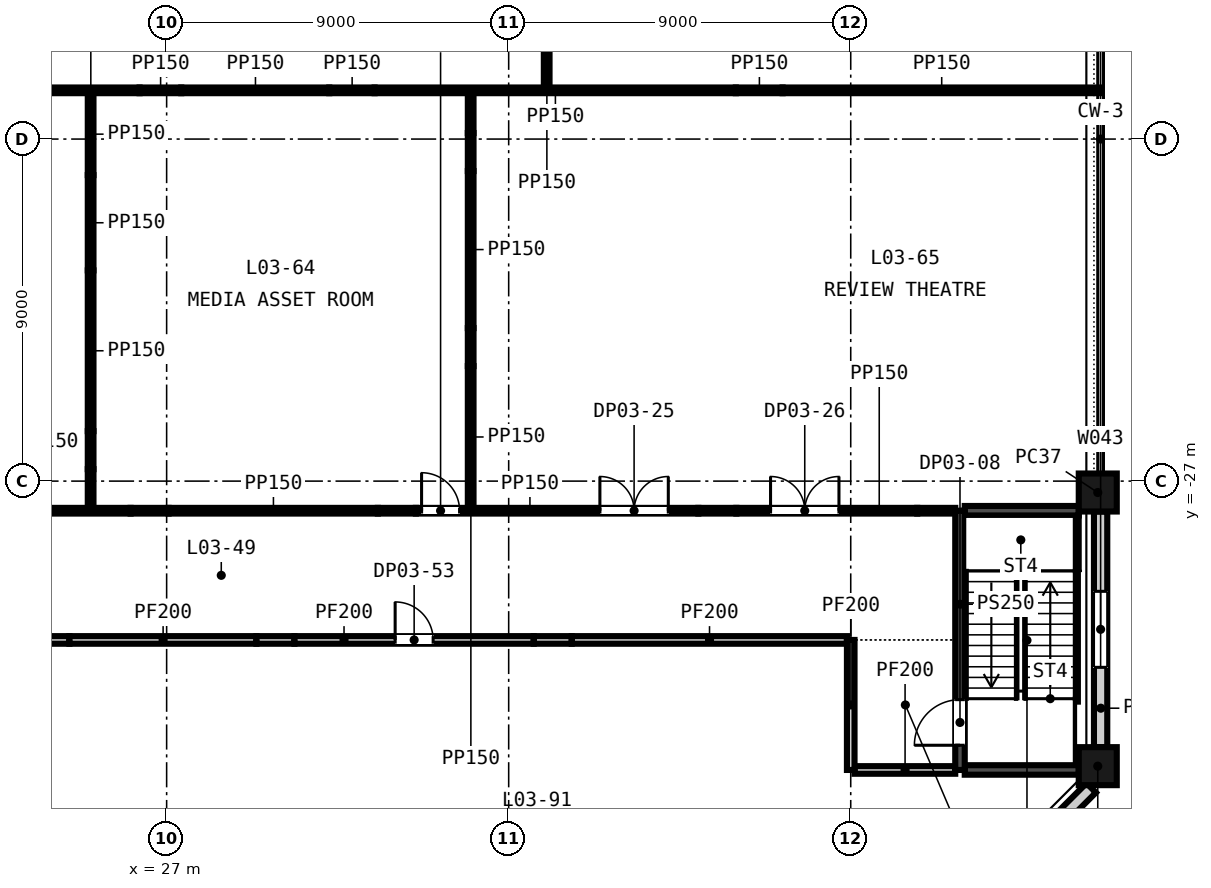
"""IFC4 building model, lengths in metres.
Left out: names, types, materials, properties, quantities, classifications, styles, units other than length and angle.
Written with IfcOpenShell. Run it as: python <this file> out.ifc"""

import sys

from ifc_helpers import new_model, si_unit, direction, frame, frame_2d, origin, origin_2d, place, context, subcontext, project, spatial, rectangle, extrude, element, fill, save


model = new_model("IFC4")
c1 = context("Model", 3, precision=1e-05, world=origin(), true_north=direction((0.0, 1.0)))
c2 = subcontext(c1, "Body", "Model", "MODEL_VIEW")
j1 = project(units=[si_unit("LENGTHUNIT", "METRE"), si_unit("PLANEANGLEUNIT", "RADIAN")], contexts=[c1])
p1 = place(None, origin())
s1 = spatial("IfcSite", under=j1, at=p1, CompositionType="ELEMENT")
p2 = place(p1, origin())
s2 = spatial("IfcBuilding", under=s1, at=p2, CompositionType="ELEMENT")
p3 = place(p2, frame((0.0, 0.0, 22.5)))
s3 = spatial("IfcBuildingStorey", under=s2, at=p3, CompositionType="ELEMENT", Elevation=22.5)
for number, where, z_axis, x_axis in (
    (1, (51.5, -34.5, -0.3), (0.0, 0.0, 1.0), (0.0, 1.0, 0.0)),
    (2, (51.5, -27.3, -0.3), (0.0, 0.0, 1.0), (0.0, 1.0, 0.0)),
):
    element("IfcColumn", number, at=place(p3, frame(where, z_axis=z_axis, x_axis=x_axis)), inside=s3, PredefinedType="COLUMN", context=c2, shape_type="SweptSolid", body=[
        extrude(rectangle(XDim=1.0, YDim=1.0, at=origin_2d()), origin(), (0.0, 0.0, 1.0), 4.5),
    ])
p4 = place(p3, frame((46.072, -40.327, -0.3), z_axis=(0.0, 0.0, 1.0), x_axis=(0.707106781187, 0.707106781187, 0.0)))
e3 = element("IfcWall", 3, at=p4, inside=s3, PredefinedType="SOLIDWALL", context=c2, shape_type="SweptSolid", body=[
    extrude(rectangle(XDim=7.433, YDim=0.35, at=frame_2d((3.716, 0.0))), origin(), (0.0, 0.0, 1.0), 3.6),
])
p5 = place(p3, frame((51.575, -34.0, -0.3), z_axis=(0.0, 0.0, 1.0), x_axis=(0.0, 1.0, 0.0)))
e4 = element("IfcWall", 4, at=p5, inside=s3, PredefinedType="SOLIDWALL", context=c2, shape_type="SweptSolid", body=[
    extrude(rectangle(XDim=6.2, YDim=0.35, at=frame_2d((3.1, 0.0))), origin(), (0.0, 0.0, 1.0), 3.6),
])
p6 = place(p5, frame((2.1, 0.0, 1.2)))
e5 = element("IfcOpeningElement", 5, at=p6, cuts=e4, PredefinedType="OPENING", context=c2, shape_type="SweptSolid", body=[
    extrude(rectangle(XDim=2.0, YDim=2.35, at=frame_2d((1.0, 1.175))), frame((0.0, 0.185, 0.0), z_axis=(0.0, -1.0, 0.0), x_axis=(1.0, 0.0, 0.0)), (0.0, 0.0, 1.0), 0.37),
])
p7 = place(p3, frame((45.1, -34.6, 0.0), z_axis=(0.0, 0.0, 1.0), x_axis=(1.0, 0.0, 0.0)))
e6 = element("IfcWall", 6, at=p7, inside=s3, PredefinedType="PARTITIONING", context=c2, shape_type="SweptSolid", body=[
    extrude(rectangle(XDim=2.65, YDim=0.2, at=frame_2d((1.325, 0.0))), origin(), (0.0, 0.0, 1.0), 4.2),
])
p8 = place(p3, frame((48.0, -34.6, 0.0), z_axis=(0.0, 0.0, 1.0), x_axis=(1.0, 0.0, 0.0)))
e7 = element("IfcWall", 7, at=p8, inside=s3, PredefinedType="SHEAR", context=c2, shape_type="SweptSolid", body=[
    extrude(rectangle(XDim=3.0, YDim=0.25, at=frame_2d((1.5, 0.0))), origin(), (0.0, 0.0, 1.0), 4.2),
])
p9 = place(p3, frame((23.442, -31.179, 0.0), z_axis=(0.0, 0.0, 1.0), x_axis=(1.0, 0.0, 0.0)))
e8 = element("IfcWall", 8, at=p9, inside=s3, PredefinedType="PARTITIONING", context=c2, shape_type="SweptSolid", body=[
    extrude(rectangle(XDim=1.0, YDim=0.2, at=frame_2d((0.5, 0.0))), origin(), (0.0, 0.0, 1.0), 3.298),
])
p10 = place(p3, frame((24.442, -31.179, 0.0), z_axis=(0.0, 0.0, 1.0), x_axis=(1.0, 0.0, 0.0)))
e9 = element("IfcWall", 9, at=p10, inside=s3, PredefinedType="PARTITIONING", context=c2, shape_type="SweptSolid", body=[
    extrude(rectangle(XDim=4.921, YDim=0.2, at=frame_2d((2.46, 0.0))), origin(), (0.0, 0.0, 1.0), 4.2),
])
p11 = place(p3, frame((29.363, -31.179, 0.0), z_axis=(0.0, 0.0, 1.0), x_axis=(1.0, 0.0, 0.0)))
e10 = element("IfcWall", 10, at=p11, inside=s3, PredefinedType="PARTITIONING", context=c2, shape_type="SweptSolid", body=[
    extrude(rectangle(XDim=1.0, YDim=0.2, at=frame_2d((0.5, 0.0))), origin(), (0.0, 0.0, 1.0), 3.219),
])
p12 = place(p3, frame((30.363, -31.179, 0.0), z_axis=(0.0, 0.0, 1.0), x_axis=(1.0, 0.0, 0.0)))
e11 = element("IfcWall", 11, at=p12, inside=s3, PredefinedType="PARTITIONING", context=c2, shape_type="SweptSolid", body=[
    extrude(rectangle(XDim=6.297, YDim=0.2, at=frame_2d((3.148, 0.0))), origin(), (0.0, 0.0, 1.0), 4.2),
])
p13 = place(p12, frame((2.65, 0.0, 0.0)))
e12 = element("IfcOpeningElement", 12, at=p13, cuts=e11, PredefinedType="OPENING", context=c2, shape_type="SweptSolid", body=[
    extrude(rectangle(XDim=1.0, YDim=2.1, at=frame_2d((0.5, 1.05))), frame((0.0, 0.11, 0.0), z_axis=(0.0, -1.0, 0.0), x_axis=(1.0, 0.0, 0.0)), (0.0, 0.0, 1.0), 0.22),
])
p14 = place(p3, frame((36.659, -31.179, 0.0), z_axis=(0.0, 0.0, 1.0), x_axis=(1.0, 0.0, 0.0)))
e13 = element("IfcWall", 13, at=p14, inside=s3, PredefinedType="PARTITIONING", context=c2, shape_type="SweptSolid", body=[
    extrude(rectangle(XDim=1.0, YDim=0.2, at=frame_2d((0.5, 0.0))), origin(), (0.0, 0.0, 1.0), 3.111),
])
p15 = place(p3, frame((37.659, -31.179, 0.0), z_axis=(0.0, 0.0, 1.0), x_axis=(1.0, 0.0, 0.0)))
e14 = element("IfcWall", 14, at=p15, inside=s3, PredefinedType="PARTITIONING", context=c2, shape_type="SweptSolid", body=[
    extrude(rectangle(XDim=7.241, YDim=0.2, at=frame_2d((3.62, 0.0))), origin(), (0.0, 0.0, 1.0), 4.2),
])
p16 = place(p3, frame((21.773, -27.779, 0.0), z_axis=(0.0, 0.0, 1.0), x_axis=(1.0, 0.0, 0.0)))
e15 = element("IfcWall", 15, at=p16, inside=s3, PredefinedType="PARTITIONING", context=c2, shape_type="SweptSolid", body=[
    extrude(rectangle(XDim=4.279, YDim=0.15, at=frame_2d((2.14, 0.0))), origin(), (0.0, 0.0, 1.0), 4.2),
])
p17 = place(p3, frame((26.052, -27.779, 0.0), z_axis=(0.0, 0.0, 1.0), x_axis=(1.0, 0.0, 0.0)))
e16 = element("IfcWall", 16, at=p17, inside=s3, PredefinedType="PARTITIONING", context=c2, shape_type="SweptSolid", body=[
    extrude(rectangle(XDim=1.0, YDim=0.15, at=frame_2d((0.5, 0.0))), origin(), (0.0, 0.0, 1.0), 3.219),
])
p18 = place(p3, frame((27.052, -27.779, 0.0), z_axis=(0.0, 0.0, 1.0), x_axis=(1.0, 0.0, 0.0)))
e17 = element("IfcWall", 17, at=p18, inside=s3, PredefinedType="PARTITIONING", context=c2, shape_type="SweptSolid", body=[
    extrude(rectangle(XDim=5.506, YDim=0.15, at=frame_2d((2.753, 0.0))), origin(), (0.0, 0.0, 1.0), 4.2),
])
p19 = place(p3, frame((32.558, -27.779, 0.0), z_axis=(0.0, 0.0, 1.0), x_axis=(1.0, 0.0, 0.0)))
e18 = element("IfcWall", 18, at=p19, inside=s3, PredefinedType="PARTITIONING", context=c2, shape_type="SweptSolid", body=[
    extrude(rectangle(XDim=1.0, YDim=0.15, at=frame_2d((0.5, 0.0))), origin(), (0.0, 0.0, 1.0), 3.111),
])
p20 = place(p3, frame((33.558, -27.779, 0.0), z_axis=(0.0, 0.0, 1.0), x_axis=(1.0, 0.0, 0.0)))
e19 = element("IfcWall", 19, at=p20, inside=s3, PredefinedType="PARTITIONING", context=c2, shape_type="SweptSolid", body=[
    extrude(rectangle(XDim=7.432, YDim=0.15, at=frame_2d((3.716, 0.0))), origin(), (0.0, 0.0, 1.0), 4.2),
])
p21 = place(p20, frame((0.15, 0.0, 0.0)))
e20 = element("IfcOpeningElement", 20, at=p21, cuts=e19, PredefinedType="OPENING", context=c2, shape_type="SweptSolid", body=[
    extrude(rectangle(XDim=1.0, YDim=2.1, at=frame_2d((0.5, 1.05))), frame((0.0, 0.085, 0.0), z_axis=(0.0, -1.0, 0.0), x_axis=(1.0, 0.0, 0.0)), (0.0, 0.0, 1.0), 0.17),
])
p22 = place(p20, frame((4.842, 0.0, 0.0)))
e21 = element("IfcOpeningElement", 21, at=p22, cuts=e19, PredefinedType="OPENING", context=c2, shape_type="SweptSolid", body=[
    extrude(rectangle(XDim=1.8, YDim=2.4, at=frame_2d((0.9, 1.2))), frame((0.0, 0.085, 0.0), z_axis=(0.0, -1.0, 0.0), x_axis=(1.0, 0.0, 0.0)), (0.0, 0.0, 1.0), 0.17),
])
p23 = place(p3, frame((40.99, -27.779, 0.0), z_axis=(0.0, 0.0, 1.0), x_axis=(1.0, 0.0, 0.0)))
e22 = element("IfcWall", 22, at=p23, inside=s3, PredefinedType="PARTITIONING", context=c2, shape_type="SweptSolid", body=[
    extrude(rectangle(XDim=1.0, YDim=0.15, at=frame_2d((0.5, 0.0))), origin(), (0.0, 0.0, 1.0), 3.111),
])
p24 = place(p3, frame((41.99, -27.779, 0.0), z_axis=(0.0, 0.0, 1.0), x_axis=(1.0, 0.0, 0.0)))
e23 = element("IfcWall", 23, at=p24, inside=s3, PredefinedType="PARTITIONING", context=c2, shape_type="SweptSolid", body=[
    extrude(rectangle(XDim=4.76, YDim=0.15, at=frame_2d((2.38, 0.0))), origin(), (0.0, 0.0, 1.0), 4.2),
])
p25 = place(p24, frame((0.9, 0.0, 0.0)))
e24 = element("IfcOpeningElement", 24, at=p25, cuts=e23, PredefinedType="OPENING", context=c2, shape_type="SweptSolid", body=[
    extrude(rectangle(XDim=1.8, YDim=2.4, at=frame_2d((0.9, 1.2))), frame((0.0, 0.085, 0.0), z_axis=(0.0, -1.0, 0.0), x_axis=(1.0, 0.0, 0.0)), (0.0, 0.0, 1.0), 0.17),
])
p26 = place(p3, frame((46.75, -27.779, 0.0), z_axis=(0.0, 0.0, 1.0), x_axis=(1.0, 0.0, 0.0)))
e25 = element("IfcWall", 25, at=p26, inside=s3, PredefinedType="PARTITIONING", context=c2, shape_type="SweptSolid", body=[
    extrude(rectangle(XDim=1.0, YDim=0.15, at=frame_2d((0.5, 0.0))), origin(), (0.0, 0.0, 1.0), 3.667),
])
p27 = place(p3, frame((48.0, -27.779, 0.0), z_axis=(0.0, 0.0, 1.0), x_axis=(1.0, 0.0, 0.0)))
e26 = element("IfcWall", 26, at=p27, inside=s3, PredefinedType="SHEAR", context=c2, shape_type="SweptSolid", body=[
    extrude(rectangle(XDim=3.0, YDim=0.25, at=frame_2d((1.5, 0.0))), origin(), (0.0, 0.0, 1.0), 4.2),
])
p28 = place(p3, frame((9.03, -16.718, 0.0), z_axis=(0.0, 0.0, 1.0), x_axis=(1.0, 0.0, 0.0)))
e27 = element("IfcWall", 27, at=p28, inside=s3, PredefinedType="PARTITIONING", context=c2, shape_type="SweptSolid", body=[
    extrude(rectangle(XDim=17.258, YDim=0.15, at=frame_2d((8.629, 0.0))), origin(), (0.0, 0.0, 1.0), 4.2),
])
p29 = place(p3, frame((26.288, -16.718, 0.0), z_axis=(0.0, 0.0, 1.0), x_axis=(1.0, 0.0, 0.0)))
e28 = element("IfcWall", 28, at=p29, inside=s3, PredefinedType="PARTITIONING", context=c2, shape_type="SweptSolid", body=[
    extrude(rectangle(XDim=1.097, YDim=0.15, at=frame_2d((0.549, 0.0))), origin(), (0.0, 0.0, 1.0), 3.2),
])
p30 = place(p3, frame((27.385, -16.718, 0.0), z_axis=(0.0, 0.0, 1.0), x_axis=(1.0, 0.0, 0.0)))
e29 = element("IfcWall", 29, at=p30, inside=s3, PredefinedType="PARTITIONING", context=c2, shape_type="SweptSolid", body=[
    extrude(rectangle(XDim=3.894, YDim=0.15, at=frame_2d((1.947, 0.0))), origin(), (0.0, 0.0, 1.0), 4.2),
])
p31 = place(p3, frame((31.279, -16.718, 0.0), z_axis=(0.0, 0.0, 1.0), x_axis=(1.0, 0.0, 0.0)))
e30 = element("IfcWall", 30, at=p31, inside=s3, PredefinedType="PARTITIONING", context=c2, shape_type="SweptSolid", body=[
    extrude(rectangle(XDim=1.193, YDim=0.15, at=frame_2d((0.596, 0.0))), origin(), (0.0, 0.0, 1.0), 3.111),
])
p32 = place(p3, frame((32.472, -16.718, 0.0), z_axis=(0.0, 0.0, 1.0), x_axis=(1.0, 0.0, 0.0)))
e31 = element("IfcWall", 31, at=p32, inside=s3, PredefinedType="PARTITIONING", context=c2, shape_type="SweptSolid", body=[
    extrude(rectangle(XDim=9.504, YDim=0.15, at=frame_2d((4.752, 0.0))), origin(), (0.0, 0.0, 1.0), 4.2),
])
p33 = place(p3, frame((41.976, -16.718, 0.0), z_axis=(0.0, 0.0, 1.0), x_axis=(1.0, 0.0, 0.0)))
e32 = element("IfcWall", 32, at=p33, inside=s3, PredefinedType="PARTITIONING", context=c2, shape_type="SweptSolid", body=[
    extrude(rectangle(XDim=1.231, YDim=0.15, at=frame_2d((0.616, 0.0))), origin(), (0.0, 0.0, 1.0), 3.219),
])
p34 = place(p3, frame((43.208, -16.718, 0.0), z_axis=(0.0, 0.0, 1.0), x_axis=(1.0, 0.0, 0.0)))
e33 = element("IfcWall", 33, at=p34, inside=s3, PredefinedType="PARTITIONING", context=c2, shape_type="SweptSolid", body=[
    extrude(rectangle(XDim=8.363, YDim=0.15, at=frame_2d((4.181, 0.0))), origin(), (0.0, 0.0, 1.0), 4.2),
])
p35 = place(p3, frame((25.0, -27.704, 0.0), z_axis=(0.0, 0.0, 1.0), x_axis=(0.0, 1.0, 0.0)))
e34 = element("IfcWall", 34, at=p35, inside=s3, PredefinedType="PARTITIONING", context=c2, shape_type="SweptSolid", body=[
    extrude(rectangle(XDim=1.019, YDim=0.15, at=frame_2d((0.509, 0.0))), origin(), (0.0, 0.0, 1.0), 4.2),
])
p36 = place(p3, frame((25.0, -26.685, 0.0), z_axis=(0.0, 0.0, 1.0), x_axis=(0.0, 1.0, 0.0)))
e35 = element("IfcWall", 35, at=p36, inside=s3, PredefinedType="PARTITIONING", context=c2, shape_type="SweptSolid", body=[
    extrude(rectangle(XDim=1.0, YDim=0.15, at=frame_2d((0.5, 0.0))), origin(), (0.0, 0.0, 1.0), 3.219),
])
p37 = place(p3, frame((25.0, -25.685, 0.0), z_axis=(0.0, 0.0, 1.0), x_axis=(0.0, 1.0, 0.0)))
e36 = element("IfcWall", 36, at=p37, inside=s3, PredefinedType="PARTITIONING", context=c2, shape_type="SweptSolid", body=[
    extrude(rectangle(XDim=4.23, YDim=0.15, at=frame_2d((2.115, 0.0))), origin(), (0.0, 0.0, 1.0), 4.2),
])
p38 = place(p3, frame((25.0, -21.456, 0.0), z_axis=(0.0, 0.0, 1.0), x_axis=(0.0, 1.0, 0.0)))
e37 = element("IfcWall", 37, at=p38, inside=s3, PredefinedType="PARTITIONING", context=c2, shape_type="SweptSolid", body=[
    extrude(rectangle(XDim=2.507, YDim=0.15, at=frame_2d((1.253, 0.0))), origin(), (0.0, 0.0, 1.0), 3.111),
])
p39 = place(p3, frame((25.0, -18.949, 0.0), z_axis=(0.0, 0.0, 1.0), x_axis=(0.0, 1.0, 0.0)))
e38 = element("IfcWall", 38, at=p39, inside=s3, PredefinedType="PARTITIONING", context=c2, shape_type="SweptSolid", body=[
    extrude(rectangle(XDim=2.156, YDim=0.15, at=frame_2d((1.078, 0.0))), origin(), (0.0, 0.0, 1.0), 4.2),
])
p40 = place(p3, frame((35.0, -27.704, 0.0), z_axis=(0.0, 0.0, 1.0), x_axis=(0.0, 1.0, 0.0)))
e39 = element("IfcWall", 39, at=p40, inside=s3, PredefinedType="PARTITIONING", context=c2, shape_type="SweptSolid", body=[
    extrude(rectangle(XDim=3.731, YDim=0.15, at=frame_2d((1.865, 0.0))), origin(), (0.0, 0.0, 1.0), 4.2),
])
p41 = place(p3, frame((35.0, -23.973, 0.0), z_axis=(0.0, 0.0, 1.0), x_axis=(0.0, 1.0, 0.0)))
e40 = element("IfcWall", 40, at=p41, inside=s3, PredefinedType="PARTITIONING", context=c2, shape_type="SweptSolid", body=[
    extrude(rectangle(XDim=1.0, YDim=0.15, at=frame_2d((0.5, 0.0))), origin(), (0.0, 0.0, 1.0), 3.111),
])
p42 = place(p3, frame((35.0, -22.973, 0.0), z_axis=(0.0, 0.0, 1.0), x_axis=(0.0, 1.0, 0.0)))
e41 = element("IfcWall", 41, at=p42, inside=s3, PredefinedType="PARTITIONING", context=c2, shape_type="SweptSolid", body=[
    extrude(rectangle(XDim=4.132, YDim=0.15, at=frame_2d((2.066, 0.0))), origin(), (0.0, 0.0, 1.0), 4.2),
])
p43 = place(p3, frame((35.0, -18.841, 0.0), z_axis=(0.0, 0.0, 1.0), x_axis=(0.0, 1.0, 0.0)))
e42 = element("IfcWall", 42, at=p43, inside=s3, PredefinedType="PARTITIONING", context=c2, shape_type="SweptSolid", body=[
    extrude(rectangle(XDim=1.0, YDim=0.15, at=frame_2d((0.5, 0.0))), origin(), (0.0, 0.0, 1.0), 3.111),
])
p44 = place(p3, frame((35.0, -17.841, 0.0), z_axis=(0.0, 0.0, 1.0), x_axis=(0.0, 1.0, 0.0)))
e43 = element("IfcWall", 43, at=p44, inside=s3, PredefinedType="PARTITIONING", context=c2, shape_type="SweptSolid", body=[
    extrude(rectangle(XDim=1.048, YDim=0.15, at=frame_2d((0.524, 0.0))), origin(), (0.0, 0.0, 1.0), 4.2),
])
p45 = place(p3, frame((37.0, -16.643, 0.0), z_axis=(0.0, 0.0, 1.0), x_axis=(0.0, 1.0, 0.0)))
e44 = element("IfcWall", 44, at=p45, inside=s3, PredefinedType="PARTITIONING", context=c2, shape_type="SweptSolid", body=[
    extrude(rectangle(XDim=13.368, YDim=0.15, at=frame_2d((6.684, 0.0))), origin(), (0.0, 0.0, 1.0), 4.2),
])
p46 = place(p3, frame((45.0, -34.6, 0.0), z_axis=(0.0, 0.0, 1.0), x_axis=(0.0, 1.0, 0.0)))
e45 = element("IfcWall", 45, at=p46, inside=s3, PredefinedType="PARTITIONING", context=c2, shape_type="SweptSolid", body=[
    extrude(rectangle(XDim=3.421, YDim=0.2, at=frame_2d((1.71, 0.0))), origin(), (0.0, 0.0, 1.0), 4.2),
])
p47 = place(p3, frame((47.875, -34.6, 0.0), z_axis=(0.0, 0.0, 1.0), x_axis=(0.0, 1.0, 0.0)))
e46 = element("IfcWall", 46, at=p47, inside=s3, PredefinedType="SHEAR", context=c2, shape_type="SweptSolid", body=[
    extrude(rectangle(XDim=6.821, YDim=0.25, at=frame_2d((3.411, 0.0))), origin(), (0.0, 0.0, 1.0), 4.2),
])
p48 = place(p47, frame((0.65, 0.0, 0.0)))
e47 = element("IfcOpeningElement", 47, at=p48, cuts=e46, PredefinedType="OPENING", context=c2, shape_type="SweptSolid", body=[
    extrude(rectangle(XDim=1.2, YDim=2.1, at=frame_2d((0.6, 1.05))), frame((0.0, 0.135, 0.0), z_axis=(0.0, -1.0, 0.0), x_axis=(1.0, 0.0, 0.0)), (0.0, 0.0, 1.0), 0.27),
])
p49 = place(p6, origin())
e48 = element("IfcWindow", 48, at=p49, inside=s3, PartitioningType="SINGLE_PANEL", PredefinedType="WINDOW", context=c2, shape_type="SweptSolid", body=[
    extrude(rectangle(XDim=2.0, YDim=2.35, at=frame_2d((1.0, 1.175))), frame((0.0, 0.03, 0.0), z_axis=(0.0, -1.0, 0.0), x_axis=(1.0, 0.0, 0.0)), (0.0, 0.0, 1.0), 0.06),
])
fill(e5, e48)
p50 = place(p48, origin())
e49 = element("IfcDoor", 49, at=p50, inside=s3, OperationType="SINGLE_SWING_LEFT", PredefinedType="DOOR", context=c2, shape_type="SweptSolid", body=[
    extrude(rectangle(XDim=1.2, YDim=2.1, at=frame_2d((0.6, 1.05))), frame((0.0, 0.025, 0.0), z_axis=(0.0, -1.0, 0.0), x_axis=(1.0, 0.0, 0.0)), (0.0, 0.0, 1.0), 0.05),
])
fill(e47, e49)
p51 = place(p21, origin())
e50 = element("IfcDoor", 50, at=p51, inside=s3, OperationType="SINGLE_SWING_LEFT", PredefinedType="DOOR", context=c2, shape_type="SweptSolid", body=[
    extrude(rectangle(XDim=1.0, YDim=2.1, at=frame_2d((0.5, 1.05))), frame((0.0, 0.025, 0.0), z_axis=(0.0, -1.0, 0.0), x_axis=(1.0, 0.0, 0.0)), (0.0, 0.0, 1.0), 0.05),
])
fill(e20, e50)
p52 = place(p22, origin())
e51 = element("IfcDoor", 51, at=p52, inside=s3, OperationType="SINGLE_SWING_LEFT", PredefinedType="DOOR", context=c2, shape_type="SweptSolid", body=[
    extrude(rectangle(XDim=1.8, YDim=2.4, at=frame_2d((0.9, 1.2))), frame((0.0, 0.025, 0.0), z_axis=(0.0, -1.0, 0.0), x_axis=(1.0, 0.0, 0.0)), (0.0, 0.0, 1.0), 0.05),
])
fill(e21, e51)
p53 = place(p25, origin())
e52 = element("IfcDoor", 52, at=p53, inside=s3, OperationType="SINGLE_SWING_LEFT", PredefinedType="DOOR", context=c2, shape_type="SweptSolid", body=[
    extrude(rectangle(XDim=1.8, YDim=2.4, at=frame_2d((0.9, 1.2))), frame((0.0, 0.025, 0.0), z_axis=(0.0, -1.0, 0.0), x_axis=(1.0, 0.0, 0.0)), (0.0, 0.0, 1.0), 0.05),
])
fill(e24, e52)
p54 = place(p13, origin())
e53 = element("IfcDoor", 53, at=p54, inside=s3, OperationType="SINGLE_SWING_LEFT", PredefinedType="DOOR", context=c2, shape_type="SweptSolid", body=[
    extrude(rectangle(XDim=1.0, YDim=2.1, at=frame_2d((0.5, 1.05))), frame((0.0, 0.025, 0.0), z_axis=(0.0, -1.0, 0.0), x_axis=(1.0, 0.0, 0.0)), (0.0, 0.0, 1.0), 0.05),
])
fill(e12, e53)
save(model, sys.argv[1])
